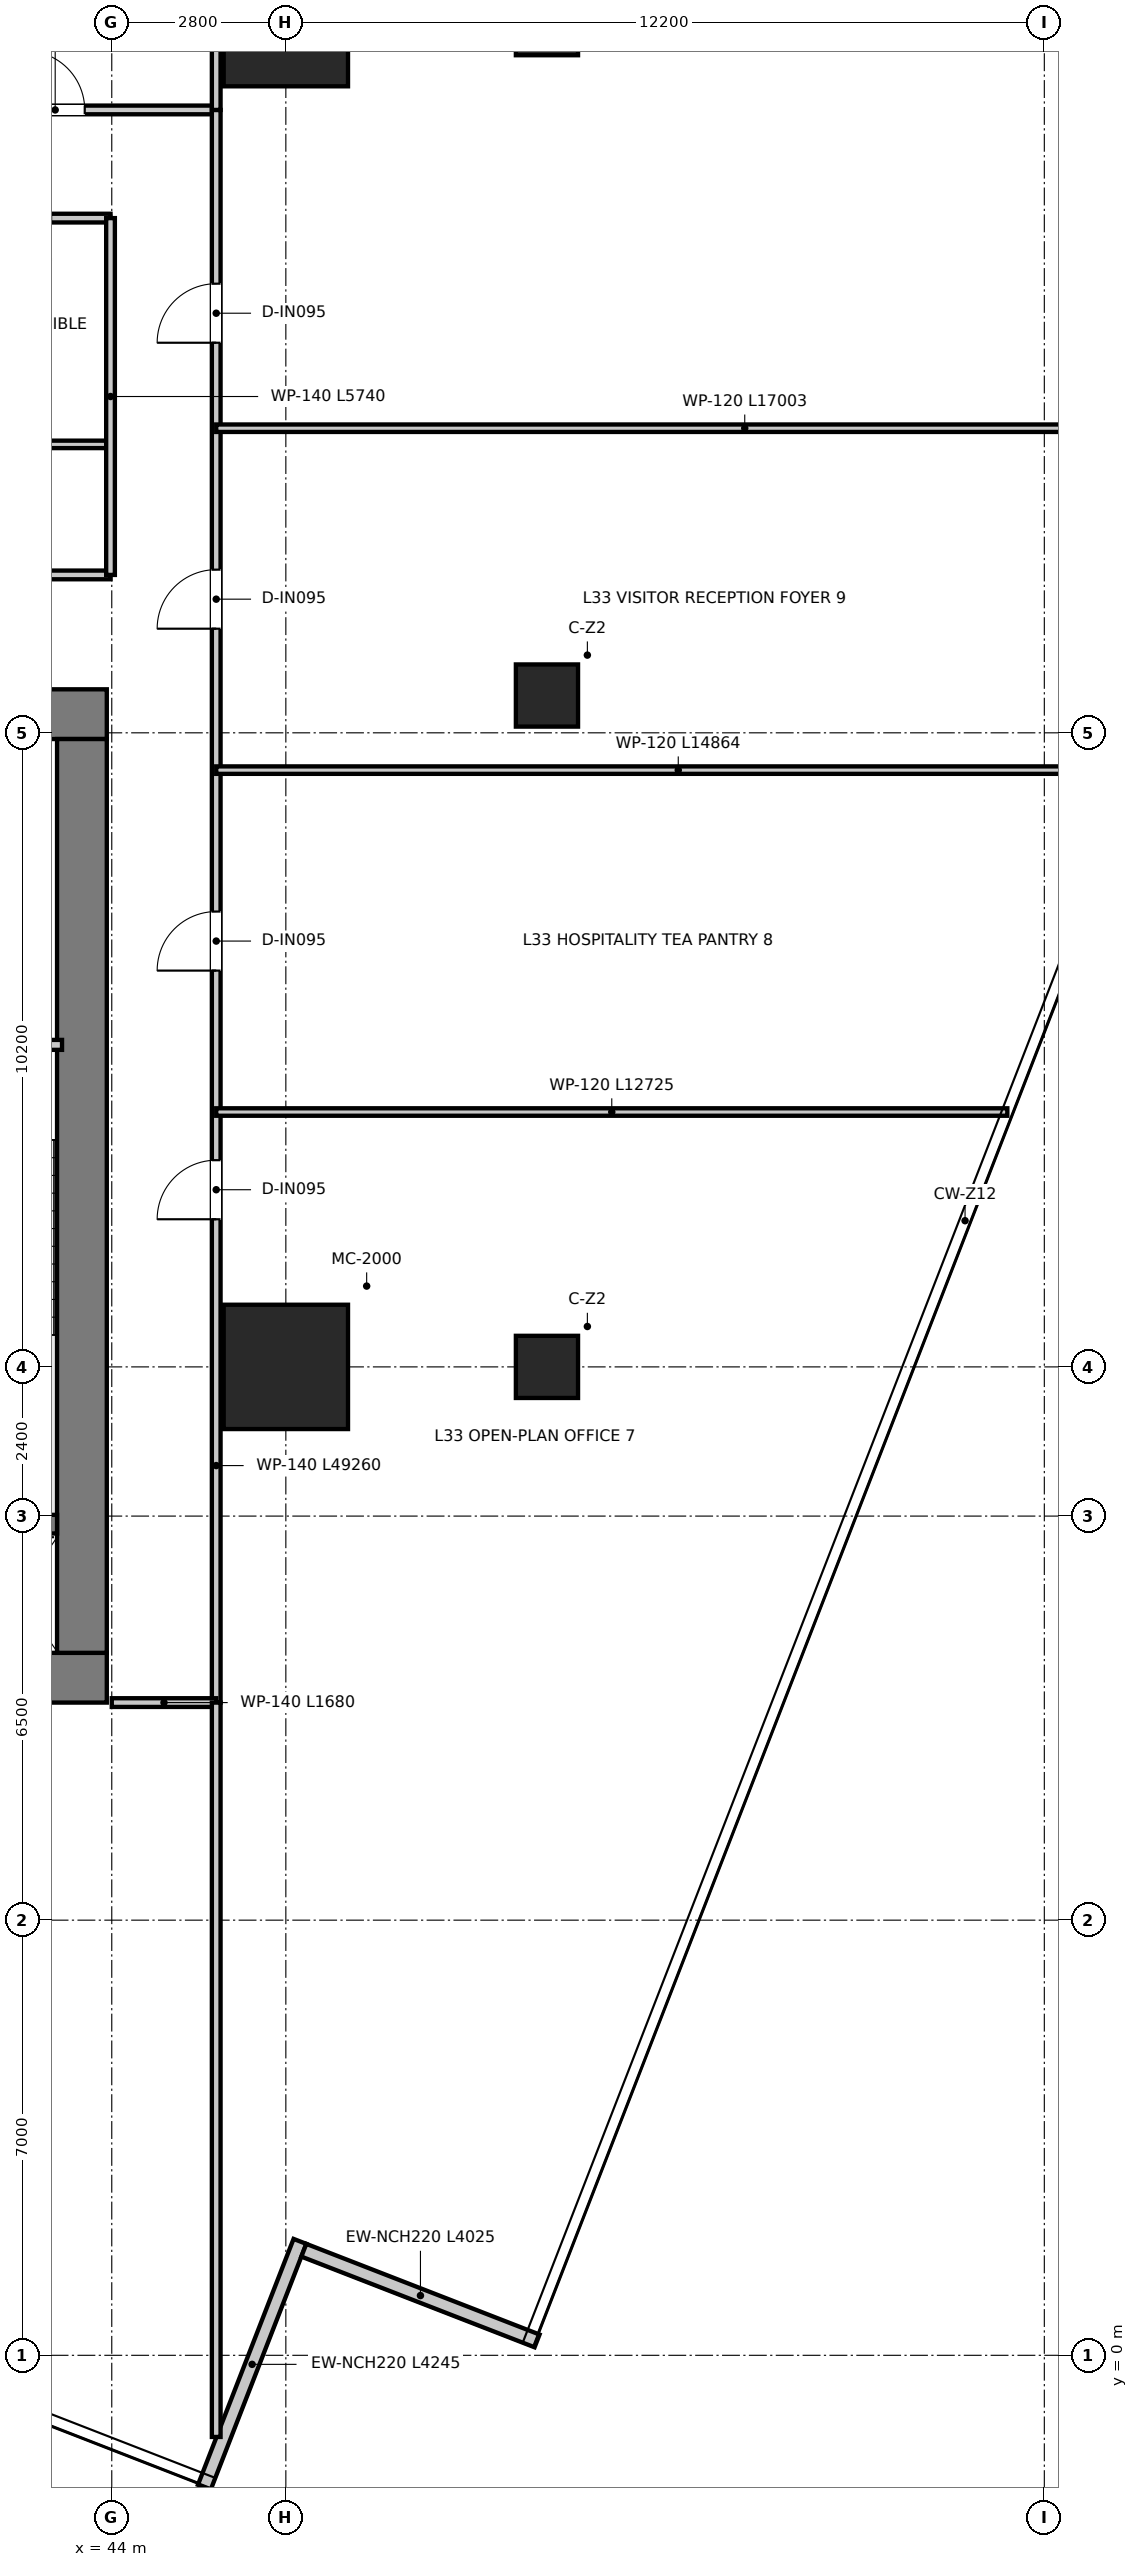
"""IFC4 building model, lengths in metres.
Left out: names, types, materials, properties, quantities, classifications, styles, units other than length and angle.
Written with IfcOpenShell. Run it as: python <this file> out.ifc"""

import sys

from ifc_helpers import new_model, si_unit, direction, frame, frame_2d, origin, origin_2d, place, context, subcontext, project, spatial, rectangle, extrude, source, transform, mapped, element, fill, save


model = new_model("IFC4")
c1 = context("Model", 3, precision=1e-05, world=origin(), true_north=direction((0.0, 1.0)))
c2 = subcontext(c1, "Body", "Model", "MODEL_VIEW")
j1 = project(units=[si_unit("LENGTHUNIT", "METRE"), si_unit("PLANEANGLEUNIT", "RADIAN")], contexts=[c1])
p1 = place(None, origin())
s1 = spatial("IfcSite", under=j1, at=p1, CompositionType="ELEMENT")
p2 = place(p1, origin())
s2 = spatial("IfcBuilding", under=s1, at=p2, CompositionType="ELEMENT")
p3 = place(p2, frame((0.0, 0.0, 137.45)))
s3 = spatial("IfcBuildingStorey", under=s2, at=p3, CompositionType="ELEMENT", Elevation=137.45)
p4 = place(p3, frame((28.08, 10.9, 0.0), z_axis=(0.0, 0.0, 1.0), x_axis=(1.0, 0.0, 0.0)))
e1 = element("IfcWall", 1, at=p4, inside=s3, PredefinedType="SHEAR", context=c2, shape_type="SweptSolid", body=[
    extrude(rectangle(XDim=15.84, YDim=0.8, at=frame_2d((7.92, 0.0))), origin(), (0.0, 0.0, 1.0), 3.95),
])
p5 = place(p3, frame((28.08, 26.4, 0.0), z_axis=(0.0, 0.0, 1.0), x_axis=(1.0, 0.0, 0.0)))
e2 = element("IfcWall", 2, at=p5, inside=s3, PredefinedType="SHEAR", context=c2, shape_type="SweptSolid", body=[
    extrude(rectangle(XDim=15.84, YDim=0.8, at=frame_2d((7.92, 0.0))), origin(), (0.0, 0.0, 1.0), 3.95),
])
p6 = place(p5, frame((7.22, 0.0, 0.0)))
e3 = element("IfcOpeningElement", 3, at=p6, cuts=e2, PredefinedType="OPENING", context=c2, shape_type="SweptSolid", body=[
    extrude(rectangle(XDim=1.4, YDim=2.2, at=frame_2d((0.7, 1.1))), frame((0.0, 0.41, 0.0), z_axis=(0.0, -1.0, 0.0), x_axis=(1.0, 0.0, 0.0)), (0.0, 0.0, 1.0), 0.82),
])
p7 = place(p5, frame((1.775, 0.0, 0.0)))
e4 = element("IfcOpeningElement", 4, at=p7, cuts=e2, PredefinedType="OPENING", context=c2, shape_type="SweptSolid", body=[
    extrude(rectangle(XDim=1.05, YDim=2.1, at=frame_2d((0.525, 1.05))), frame((0.0, 0.41, 0.0), z_axis=(0.0, -1.0, 0.0), x_axis=(1.0, 0.0, 0.0)), (0.0, 0.0, 1.0), 0.82),
])
p8 = place(p5, frame((13.015, 0.0, 0.0)))
e5 = element("IfcOpeningElement", 5, at=p8, cuts=e2, PredefinedType="OPENING", context=c2, shape_type="SweptSolid", body=[
    extrude(rectangle(XDim=1.05, YDim=2.1, at=frame_2d((0.525, 1.05))), frame((0.0, 0.41, 0.0), z_axis=(0.0, -1.0, 0.0), x_axis=(1.0, 0.0, 0.0)), (0.0, 0.0, 1.0), 0.82),
])
p9 = place(p3, frame((43.52, 11.3, 0.0), z_axis=(0.0, 0.0, 1.0), x_axis=(0.0, 1.0, 0.0)))
e6 = element("IfcWall", 6, at=p9, inside=s3, PredefinedType="SHEAR", context=c2, shape_type="SweptSolid", body=[
    extrude(rectangle(XDim=14.7, YDim=0.8, at=frame_2d((7.35, 0.0))), origin(), (0.0, 0.0, 1.0), 3.95),
])
p10 = place(p3, frame((40.02, 13.37, 0.0), z_axis=(0.0, 0.0, 1.0), x_axis=(1.0, 0.0, 0.0)))
e7 = element("IfcWall", 7, at=p10, inside=s3, PredefinedType="SHEAR", context=c2, shape_type="SweptSolid", body=[
    extrude(rectangle(XDim=3.1, YDim=0.3, at=frame_2d((1.55, 0.0))), origin(), (0.0, 0.0, 1.0), 3.95),
])
m1 = source(origin(), c2, "Body", "SweptSolid", [
    extrude(rectangle(XDim=2.0, YDim=2.0, at=origin_2d()), origin(), (0.0, 0.0, 1.0), 3.95),
])
for number, where, z_axis, x_axis in (
    (8, (46.8, 15.9, 0.0), (0.0, 0.0, 1.0), (1.0, 0.0, 0.0)),
    (9, (46.8, 37.5, 0.0), (0.0, 0.0, 1.0), (1.0, 0.0, 0.0)),
):
    element("IfcColumn", number, at=place(p3, frame(where, z_axis=z_axis, x_axis=x_axis)), inside=s3, PredefinedType="USERDEFINED", context=c2, shape_type="MappedRepresentation", body=[
        mapped(m1, transform((0.0, 0.0, 0.0), x_axis=(1.0, 0.0, 0.0), y_axis=(0.0, 1.0, 0.0), z_axis=(0.0, 0.0, 1.0), scale=1.0)),
    ])
m2 = source(origin(), c2, "Body", "SweptSolid", [
    extrude(rectangle(XDim=1.0, YDim=1.0, at=origin_2d()), origin(), (0.0, 0.0, 1.0), 3.95),
])
for number, where, z_axis, x_axis in (
    (10, (51.0, 37.5, 0.0), (0.0, 0.0, 1.0), (1.0, 0.0, 0.0)),
    (11, (51.0, 26.7, 0.0), (0.0, 0.0, 1.0), (1.0, 0.0, 0.0)),
    (12, (51.0, 15.9, 0.0), (0.0, 0.0, 1.0), (1.0, 0.0, 0.0)),
):
    element("IfcColumn", number, at=place(p3, frame(where, z_axis=z_axis, x_axis=x_axis)), inside=s3, PredefinedType="COLUMN", context=c2, shape_type="MappedRepresentation", body=[
        mapped(m2, transform((0.0, 0.0, 0.0), x_axis=(1.0, 0.0, 0.0), y_axis=(0.0, 1.0, 0.0), z_axis=(0.0, 0.0, 1.0), scale=1.0)),
    ])
p11 = place(p3, frame((45.488, -2.124, 0.0), z_axis=(0.0, 0.0, 1.0), x_axis=(0.362429609335, 0.932011147078, 0.0)))
e13 = element("IfcWall", 13, at=p11, inside=s3, PredefinedType="ELEMENTEDWALL", context=c2, shape_type="SweptSolid", body=[
    extrude(rectangle(XDim=4.245, YDim=0.22, at=frame_2d((2.123, 0.0))), origin(), (0.0, 0.0, 1.0), 3.6),
])
p12 = place(p3, frame((47.09, 1.69, 0.0), z_axis=(0.0, 0.0, 1.0), x_axis=(0.932010363197, -0.362431625129, 0.0)))
e14 = element("IfcWall", 14, at=p12, inside=s3, PredefinedType="ELEMENTEDWALL", context=c2, shape_type="SweptSolid", body=[
    extrude(rectangle(XDim=4.025, YDim=0.22, at=frame_2d((2.012, 0.0))), origin(), (0.0, 0.0, 1.0), 3.6),
])
p13 = place(p3, frame((40.04, 21.08, 0.0), z_axis=(0.0, 0.0, 1.0), x_axis=(1.0, 0.0, 0.0)))
e15 = element("IfcWall", 15, at=p13, inside=s3, PredefinedType="PARTITIONING", context=c2, shape_type="SweptSolid", body=[
    extrude(rectangle(XDim=3.16, YDim=0.16, at=frame_2d((1.58, 0.0))), origin(), (0.0, 0.0, 1.0), 3.6),
])
p14 = place(p13, frame((1.055, 0.0, 0.0)))
e16 = element("IfcOpeningElement", 16, at=p14, cuts=e15, PredefinedType="OPENING", context=c2, shape_type="SweptSolid", body=[
    extrude(rectangle(XDim=1.05, YDim=2.1, at=frame_2d((0.525, 1.05))), frame((0.0, 0.09, 0.0), z_axis=(0.0, -1.0, 0.0), x_axis=(1.0, 0.0, 0.0)), (0.0, 0.0, 1.0), 0.18),
])
p15 = place(p3, frame((28.02, 28.64, 0.0), z_axis=(0.0, 0.0, 1.0), x_axis=(1.0, 0.0, 0.0)))
e17 = element("IfcWall", 17, at=p15, inside=s3, PredefinedType="PARTITIONING", context=c2, shape_type="SweptSolid", body=[
    extrude(rectangle(XDim=15.96, YDim=0.14, at=frame_2d((7.98, 0.0))), origin(), (0.0, 0.0, 1.0), 3.01),
])
p16 = place(p15, frame((7.455, 0.0, 0.0)))
e18 = element("IfcOpeningElement", 18, at=p16, cuts=e17, PredefinedType="OPENING", context=c2, shape_type="SweptSolid", body=[
    extrude(rectangle(XDim=1.05, YDim=2.15, at=frame_2d((0.525, 1.075))), frame((0.0, 0.08, 0.0), z_axis=(0.0, -1.0, 0.0), x_axis=(1.0, 0.0, 0.0)), (0.0, 0.0, 1.0), 0.16),
])
p17 = place(p3, frame((28.02, 30.74, 0.0), z_axis=(0.0, 0.0, 1.0), x_axis=(1.0, 0.0, 0.0)))
e19 = element("IfcWall", 19, at=p17, inside=s3, PredefinedType="PARTITIONING", context=c2, shape_type="SweptSolid", body=[
    extrude(rectangle(XDim=15.96, YDim=0.12, at=frame_2d((7.98, 0.0))), origin(), (0.0, 0.0, 1.0), 3.01),
])
p18 = place(p3, frame((28.02, 34.38, 0.0), z_axis=(0.0, 0.0, 1.0), x_axis=(1.0, 0.0, 0.0)))
e20 = element("IfcWall", 20, at=p18, inside=s3, PredefinedType="PARTITIONING", context=c2, shape_type="SweptSolid", body=[
    extrude(rectangle(XDim=15.96, YDim=0.14, at=frame_2d((7.98, 0.0))), origin(), (0.0, 0.0, 1.0), 3.01),
])
p19 = place(p18, frame((7.83, 0.0, 0.0)))
e21 = element("IfcOpeningElement", 21, at=p19, cuts=e20, PredefinedType="OPENING", context=c2, shape_type="SweptSolid", body=[
    extrude(rectangle(XDim=0.9, YDim=2.1, at=frame_2d((0.45, 1.05))), frame((0.0, 0.08, 0.0), z_axis=(0.0, -1.0, 0.0), x_axis=(1.0, 0.0, 0.0)), (0.0, 0.0, 1.0), 0.16),
])
p20 = place(p18, frame((11.03, 0.0, 0.0)))
e22 = element("IfcOpeningElement", 22, at=p20, cuts=e20, PredefinedType="OPENING", context=c2, shape_type="SweptSolid", body=[
    extrude(rectangle(XDim=0.9, YDim=2.1, at=frame_2d((0.45, 1.05))), frame((0.0, 0.08, 0.0), z_axis=(0.0, -1.0, 0.0), x_axis=(1.0, 0.0, 0.0)), (0.0, 0.0, 1.0), 0.16),
])
p21 = place(p18, frame((14.055, 0.0, 0.0)))
e23 = element("IfcOpeningElement", 23, at=p21, cuts=e20, PredefinedType="OPENING", context=c2, shape_type="SweptSolid", body=[
    extrude(rectangle(XDim=0.95, YDim=2.1, at=frame_2d((0.475, 1.05))), frame((0.0, 0.08, 0.0), z_axis=(0.0, -1.0, 0.0), x_axis=(1.0, 0.0, 0.0)), (0.0, 0.0, 1.0), 0.16),
])
p22 = place(p18, frame((2.855, 0.0, 0.0)))
e24 = element("IfcOpeningElement", 24, at=p22, cuts=e20, PredefinedType="OPENING", context=c2, shape_type="SweptSolid", body=[
    extrude(rectangle(XDim=0.95, YDim=2.1, at=frame_2d((0.475, 1.05))), frame((0.0, 0.08, 0.0), z_axis=(0.0, -1.0, 0.0), x_axis=(1.0, 0.0, 0.0)), (0.0, 0.0, 1.0), 0.16),
])
p23 = place(p3, frame((43.98, 28.64, 0.0), z_axis=(0.0, 0.0, 1.0), x_axis=(0.0, 1.0, 0.0)))
e25 = element("IfcWall", 25, at=p23, inside=s3, PredefinedType="PARTITIONING", context=c2, shape_type="SweptSolid", body=[
    extrude(rectangle(XDim=5.74, YDim=0.14, at=frame_2d((2.87, 0.0))), origin(), (0.0, 0.0, 1.0), 3.2),
])
p24 = place(p3, frame((26.32, 36.12, 0.0), z_axis=(0.0, 0.0, 1.0), x_axis=(1.0, 0.0, 0.0)))
e26 = element("IfcWall", 26, at=p24, inside=s3, PredefinedType="PARTITIONING", context=c2, shape_type="SweptSolid", body=[
    extrude(rectangle(XDim=19.36, YDim=0.14, at=frame_2d((9.68, 0.0))), origin(), (0.0, 0.0, 1.0), 3.01),
])
p25 = place(p24, frame((3.115, 0.0, 0.0)))
e27 = element("IfcOpeningElement", 27, at=p25, cuts=e26, PredefinedType="OPENING", context=c2, shape_type="SweptSolid", body=[
    extrude(rectangle(XDim=0.95, YDim=2.1, at=frame_2d((0.475, 1.05))), frame((0.0, 0.08, 0.0), z_axis=(0.0, -1.0, 0.0), x_axis=(1.0, 0.0, 0.0)), (0.0, 0.0, 1.0), 0.16),
])
p26 = place(p24, frame((10.205, 0.0, 0.0)))
e28 = element("IfcOpeningElement", 28, at=p26, cuts=e26, PredefinedType="OPENING", context=c2, shape_type="SweptSolid", body=[
    extrude(rectangle(XDim=0.95, YDim=2.1, at=frame_2d((0.475, 1.05))), frame((0.0, 0.08, 0.0), z_axis=(0.0, -1.0, 0.0), x_axis=(1.0, 0.0, 0.0)), (0.0, 0.0, 1.0), 0.16),
])
p27 = place(p24, frame((16.295, 0.0, 0.0)))
e29 = element("IfcOpeningElement", 29, at=p27, cuts=e26, PredefinedType="OPENING", context=c2, shape_type="SweptSolid", body=[
    extrude(rectangle(XDim=0.95, YDim=2.1, at=frame_2d((0.475, 1.05))), frame((0.0, 0.08, 0.0), z_axis=(0.0, -1.0, 0.0), x_axis=(1.0, 0.0, 0.0)), (0.0, 0.0, 1.0), 0.16),
])
p28 = place(p3, frame((45.68, 10.5, 0.0), z_axis=(0.0, 0.0, 1.0), x_axis=(0.0, 1.0, 0.0)))
e30 = element("IfcWall", 30, at=p28, inside=s3, PredefinedType="PARTITIONING", context=c2, shape_type="SweptSolid", body=[
    extrude(rectangle(XDim=25.62, YDim=0.14, at=frame_2d((12.81, 0.0))), origin(), (0.0, 0.0, 1.0), 2.9),
])
p29 = place(p28, frame((7.775, 0.0, 0.0)))
e31 = element("IfcOpeningElement", 31, at=p29, cuts=e30, PredefinedType="OPENING", context=c2, shape_type="SweptSolid", body=[
    extrude(rectangle(XDim=0.95, YDim=2.1, at=frame_2d((0.475, 1.05))), frame((0.0, 0.08, 0.0), z_axis=(0.0, -1.0, 0.0), x_axis=(1.0, 0.0, 0.0)), (0.0, 0.0, 1.0), 0.16),
])
p30 = place(p28, frame((11.775, 0.0, 0.0)))
e32 = element("IfcOpeningElement", 32, at=p30, cuts=e30, PredefinedType="OPENING", context=c2, shape_type="SweptSolid", body=[
    extrude(rectangle(XDim=0.95, YDim=2.1, at=frame_2d((0.475, 1.05))), frame((0.0, 0.08, 0.0), z_axis=(0.0, -1.0, 0.0), x_axis=(1.0, 0.0, 0.0)), (0.0, 0.0, 1.0), 0.16),
])
p31 = place(p28, frame((17.275, 0.0, 0.0)))
e33 = element("IfcOpeningElement", 33, at=p31, cuts=e30, PredefinedType="OPENING", context=c2, shape_type="SweptSolid", body=[
    extrude(rectangle(XDim=0.95, YDim=2.1, at=frame_2d((0.475, 1.05))), frame((0.0, 0.08, 0.0), z_axis=(0.0, -1.0, 0.0), x_axis=(1.0, 0.0, 0.0)), (0.0, 0.0, 1.0), 0.16),
])
p32 = place(p28, frame((21.875, 0.0, 0.0)))
e34 = element("IfcOpeningElement", 34, at=p32, cuts=e30, PredefinedType="OPENING", context=c2, shape_type="SweptSolid", body=[
    extrude(rectangle(XDim=0.95, YDim=2.1, at=frame_2d((0.475, 1.05))), frame((0.0, 0.08, 0.0), z_axis=(0.0, -1.0, 0.0), x_axis=(1.0, 0.0, 0.0)), (0.0, 0.0, 1.0), 0.16),
])
p33 = place(p3, frame((44.0, 10.5, 0.0), z_axis=(0.0, 0.0, 1.0), x_axis=(1.0, 0.0, 0.0)))
e35 = element("IfcWall", 35, at=p33, inside=s3, PredefinedType="PARTITIONING", context=c2, shape_type="SweptSolid", body=[
    extrude(rectangle(XDim=1.68, YDim=0.14, at=frame_2d((0.84, 0.0))), origin(), (0.0, 0.0, 1.0), 3.6),
])
p34 = place(p3, frame((45.68, 36.12, 0.0), z_axis=(0.0, 0.0, 1.0), x_axis=(0.0, 1.0, 0.0)))
e36 = element("IfcWall", 36, at=p34, inside=s3, PredefinedType="PARTITIONING", context=c2, shape_type="SweptSolid", body=[
    extrude(rectangle(XDim=11.826, YDim=0.14, at=frame_2d((5.913, 0.0))), origin(), (0.0, 0.0, 1.0), 2.9),
])
p35 = place(p3, frame((45.68, -1.313, 0.0), z_axis=(0.0, 0.0, 1.0), x_axis=(0.0, 1.0, 0.0)))
e37 = element("IfcWall", 37, at=p35, inside=s3, PredefinedType="PARTITIONING", context=c2, shape_type="SweptSolid", body=[
    extrude(rectangle(XDim=11.813, YDim=0.14, at=frame_2d((5.907, 0.0))), origin(), (0.0, 0.0, 1.0), 3.6),
])
p36 = place(p3, frame((45.68, 20.0, 0.0), z_axis=(0.0, 0.0, 1.0), x_axis=(1.0, 0.0, 0.0)))
e38 = element("IfcWall", 38, at=p36, inside=s3, PredefinedType="PARTITIONING", context=c2, shape_type="SweptSolid", body=[
    extrude(rectangle(XDim=12.725, YDim=0.12, at=frame_2d((6.363, 0.0))), origin(), (0.0, 0.0, 1.0), 2.9),
])
p37 = place(p3, frame((45.68, 25.5, 0.0), z_axis=(0.0, 0.0, 1.0), x_axis=(1.0, 0.0, 0.0)))
e39 = element("IfcWall", 39, at=p37, inside=s3, PredefinedType="PARTITIONING", context=c2, shape_type="SweptSolid", body=[
    extrude(rectangle(XDim=14.864, YDim=0.12, at=frame_2d((7.432, 0.0))), origin(), (0.0, 0.0, 1.0), 2.9),
])
p38 = place(p3, frame((45.68, 31.0, 0.0), z_axis=(0.0, 0.0, 1.0), x_axis=(1.0, 0.0, 0.0)))
e40 = element("IfcWall", 40, at=p38, inside=s3, PredefinedType="PARTITIONING", context=c2, shape_type="SweptSolid", body=[
    extrude(rectangle(XDim=17.003, YDim=0.12, at=frame_2d((8.501, 0.0))), origin(), (0.0, 0.0, 1.0), 2.9),
])
p39 = place(p27, origin())
e41 = element("IfcDoor", 41, at=p39, inside=s3, OperationType="SINGLE_SWING_LEFT", PredefinedType="DOOR", context=c2, shape_type="SweptSolid", body=[
    extrude(rectangle(XDim=0.95, YDim=2.1, at=frame_2d((0.475, 1.05))), frame((0.0, 0.025, 0.0), z_axis=(0.0, -1.0, 0.0), x_axis=(1.0, 0.0, 0.0)), (0.0, 0.0, 1.0), 0.05),
])
fill(e29, e41)
p40 = place(p29, origin())
e42 = element("IfcDoor", 42, at=p40, inside=s3, OperationType="SINGLE_SWING_LEFT", PredefinedType="DOOR", context=c2, shape_type="SweptSolid", body=[
    extrude(rectangle(XDim=0.95, YDim=2.1, at=frame_2d((0.475, 1.05))), frame((0.0, 0.025, 0.0), z_axis=(0.0, -1.0, 0.0), x_axis=(1.0, 0.0, 0.0)), (0.0, 0.0, 1.0), 0.05),
])
fill(e31, e42)
p41 = place(p30, origin())
e43 = element("IfcDoor", 43, at=p41, inside=s3, OperationType="SINGLE_SWING_LEFT", PredefinedType="DOOR", context=c2, shape_type="SweptSolid", body=[
    extrude(rectangle(XDim=0.95, YDim=2.1, at=frame_2d((0.475, 1.05))), frame((0.0, 0.025, 0.0), z_axis=(0.0, -1.0, 0.0), x_axis=(1.0, 0.0, 0.0)), (0.0, 0.0, 1.0), 0.05),
])
fill(e32, e43)
p42 = place(p31, origin())
e44 = element("IfcDoor", 44, at=p42, inside=s3, OperationType="SINGLE_SWING_LEFT", PredefinedType="DOOR", context=c2, shape_type="SweptSolid", body=[
    extrude(rectangle(XDim=0.95, YDim=2.1, at=frame_2d((0.475, 1.05))), frame((0.0, 0.025, 0.0), z_axis=(0.0, -1.0, 0.0), x_axis=(1.0, 0.0, 0.0)), (0.0, 0.0, 1.0), 0.05),
])
fill(e33, e44)
p43 = place(p32, origin())
e45 = element("IfcDoor", 45, at=p43, inside=s3, OperationType="SINGLE_SWING_LEFT", PredefinedType="DOOR", context=c2, shape_type="SweptSolid", body=[
    extrude(rectangle(XDim=0.95, YDim=2.1, at=frame_2d((0.475, 1.05))), frame((0.0, 0.025, 0.0), z_axis=(0.0, -1.0, 0.0), x_axis=(1.0, 0.0, 0.0)), (0.0, 0.0, 1.0), 0.05),
])
fill(e34, e45)
save(model, sys.argv[1])
